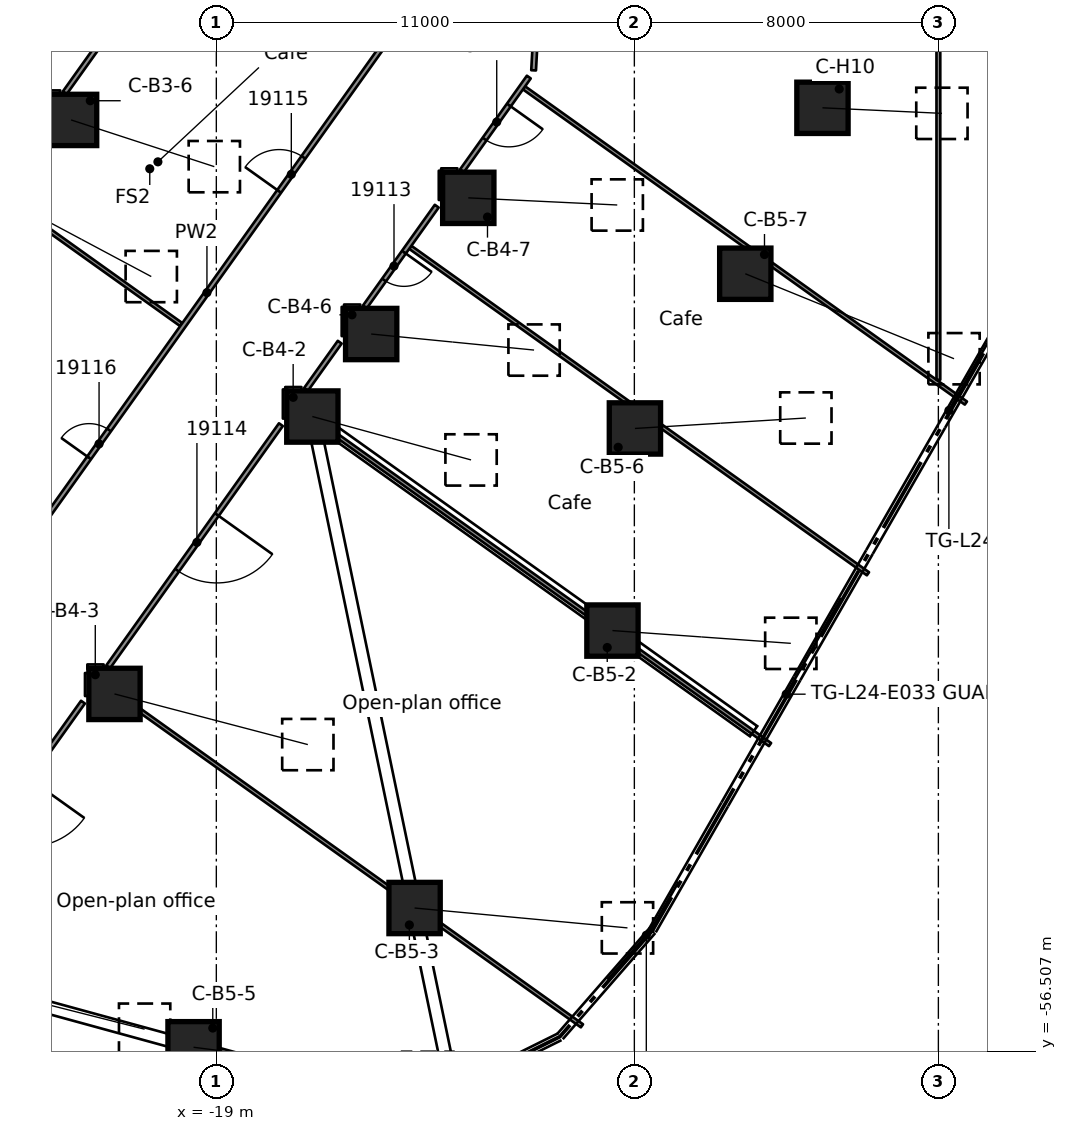
"""IFC4 building model, lengths in metres.
Left out: names, types, materials, properties, quantities, classifications, styles, units other than length and angle.
Written with IfcOpenShell. Run it as: python <this file> out.ifc"""

import sys

from ifc_helpers import new_model, si_unit, direction, frame, frame_2d, origin, origin_2d, place, context, subcontext, project, spatial, rectangle, extrude, element, fill, save


model = new_model("IFC4")
c1 = context("Model", 3, precision=1e-05, world=origin(), true_north=direction((0.0, 1.0)))
c2 = subcontext(c1, "Body", "Model", "MODEL_VIEW")
j1 = project(units=[si_unit("LENGTHUNIT", "METRE"), si_unit("PLANEANGLEUNIT", "RADIAN")], contexts=[c1])
p1 = place(None, origin())
s1 = spatial("IfcSite", under=j1, at=p1, CompositionType="ELEMENT")
p2 = place(p1, origin())
s2 = spatial("IfcBuilding", under=s1, at=p2, CompositionType="ELEMENT")
p3 = place(p2, frame((0.0, 0.0, 98.2)))
s3 = spatial("IfcBuildingStorey", under=s2, at=p3, CompositionType="ELEMENT", Elevation=98.2)
p4 = place(p3, frame((-24.37, -34.166, 0.553), z_axis=(0.723657942308, -0.38573518321, 0.572300228), x_axis=(0.470383419511, 0.882462145731, 0.0)))
e1 = element("IfcColumn", 1, at=p4, inside=s3, PredefinedType="COLUMN", context=c2, shape_type="SweptSolid", body=[
    extrude(rectangle(XDim=1.35, YDim=1.35, at=origin_2d()), origin(), (0.0, 0.0, 1.0), 5.055),
])
p5 = place(p3, frame((-22.822, -31.995, 0.544), z_axis=(0.76622208447, -0.249848553778, 0.592013021347), x_axis=(0.310013339183, 0.950732207053, 0.0)))
e2 = element("IfcColumn", 2, at=p5, inside=s3, PredefinedType="COLUMN", context=c2, shape_type="SweptSolid", body=[
    extrude(rectangle(XDim=1.35, YDim=1.35, at=origin_2d()), origin(), (0.0, 0.0, 1.0), 4.919),
])
p6 = place(p3, frame((-16.473, -39.799, 0.562), z_axis=(0.803489718201, -0.21971009191, 0.553291738831), x_axis=(0.263761556788, 0.964587912614, 0.0)))
e3 = element("IfcColumn", 3, at=p6, inside=s3, PredefinedType="COLUMN", context=c2, shape_type="SweptSolid", body=[
    extrude(rectangle(XDim=1.35, YDim=1.35, at=origin_2d()), origin(), (0.0, 0.0, 1.0), 5.197),
])
p7 = place(p3, frame((-21.68, -47.098, 0.595), z_axis=(0.853278071018, -0.223555579067, 0.471104485851), x_axis=(0.253442130639, 0.967350549913, 0.0)))
e4 = element("IfcColumn", 4, at=p7, inside=s3, PredefinedType="COLUMN", context=c2, shape_type="SweptSolid", body=[
    extrude(rectangle(XDim=1.35, YDim=1.35, at=origin_2d()), origin(), (0.0, 0.0, 1.0), 5.963),
])
p8 = place(p3, frame((-26.887, -54.398, 0.616), z_axis=(0.884883669901, -0.224461458258, 0.408164114664), x_axis=(0.245875069926, 0.969301526868, 0.0)))
e5 = element("IfcColumn", 5, at=p8, inside=s3, PredefinedType="COLUMN", context=c2, shape_type="SweptSolid", body=[
    extrude(rectangle(XDim=1.35, YDim=1.35, at=origin_2d()), origin(), (0.0, 0.0, 1.0), 6.781),
])
p9 = place(p3, frame((-14.925, -37.628, 0.561), z_axis=(0.827494463111, -0.081495666822, 0.555528009924), x_axis=(0.098010679686, 0.995185362969, 0.0)))
e6 = element("IfcColumn", 6, at=p9, inside=s3, PredefinedType="COLUMN", context=c2, shape_type="SweptSolid", body=[
    extrude(rectangle(XDim=1.35, YDim=1.35, at=origin_2d()), origin(), (0.0, 0.0, 1.0), 5.18),
])
p10 = place(p3, frame((-12.37, -34.045, 0.542), z_axis=(0.801721304484, -0.038445874351, 0.596460279216), x_axis=(0.047899120468, 0.998852178382, 0.0)))
e7 = element("IfcColumn", 7, at=p10, inside=s3, PredefinedType="COLUMN", context=c2, shape_type="SweptSolid", body=[
    extrude(rectangle(XDim=1.35, YDim=1.35, at=origin_2d()), origin(), (0.0, 0.0, 1.0), 4.89),
])
p11 = place(p3, frame((-8.576, -45.431, 0.578), z_axis=(0.853552299411, -0.061145641259, 0.517406689873), x_axis=(0.071453557827, 0.997443927784, 0.0)))
e8 = element("IfcColumn", 8, at=p11, inside=s3, PredefinedType="COLUMN", context=c2, shape_type="SweptSolid", body=[
    extrude(rectangle(XDim=1.35, YDim=1.35, at=origin_2d()), origin(), (0.0, 0.0, 1.0), 5.498),
])
p12 = place(p3, frame((-13.783, -52.731, 0.605), z_axis=(0.891988724473, -0.083266793682, 0.444322806621), x_axis=(0.092945511345, 0.995671196691, 0.0)))
e9 = element("IfcColumn", 9, at=p12, inside=s3, PredefinedType="COLUMN", context=c2, shape_type="SweptSolid", body=[
    extrude(rectangle(XDim=1.35, YDim=1.35, at=origin_2d()), origin(), (0.0, 0.0, 1.0), 6.281),
])
p13 = place(p3, frame((-19.599, -56.395, 0.617), z_axis=(0.906052673299, -0.116451460863, 0.406826265709), x_axis=(0.127477562547, 0.991841454592, 0.0)))
e10 = element("IfcColumn", 10, at=p13, inside=s3, PredefinedType="COLUMN", context=c2, shape_type="SweptSolid", body=[
    extrude(rectangle(XDim=1.35, YDim=1.35, at=origin_2d()), origin(), (0.0, 0.0, 1.0), 6.801),
])
p14 = place(p3, frame((-7.985, -40.113, 0.57), z_axis=(0.8427337001, 0.05155019974, 0.53585677902), x_axis=(-0.061056089739, 0.998134336603, 0.0)))
e11 = element("IfcColumn", 11, at=p14, inside=s3, PredefinedType="COLUMN", context=c2, shape_type="SweptSolid", body=[
    extrude(rectangle(XDim=1.35, YDim=1.35, at=origin_2d()), origin(), (0.0, 0.0, 1.0), 5.337),
])
p15 = place(p3, frame((-5.081, -36.042, 0.611), z_axis=(0.838787270737, -0.341442338342, 0.424090844085), x_axis=(0.377026202112, 0.926202592806, 0.0)))
e12 = element("IfcColumn", 12, at=p15, inside=s3, PredefinedType="COLUMN", context=c2, shape_type="SweptSolid", body=[
    extrude(rectangle(XDim=1.35, YDim=1.35, at=origin_2d()), origin(), (0.0, 0.0, 1.0), 6.549),
])
p16 = place(p3, frame((-3.05, -31.676, 0.486), z_axis=(0.719838795512, -0.03343666302, 0.693335487366), x_axis=(0.046400179673, 0.998922931625, 0.0)))
e13 = element("IfcColumn", 13, at=p16, inside=s3, PredefinedType="COLUMN", context=c2, shape_type="SweptSolid", body=[
    extrude(rectangle(XDim=1.35, YDim=1.35, at=origin_2d()), origin(), (0.0, 0.0, 1.0), 4.366),
])
p17 = place(p3, frame((-22.302, -46.613, 0.0), z_axis=(0.0, 0.0, 1.0), x_axis=(0.814113642146, -0.580705586052, 0.0)))
e14 = element("IfcWall", 14, at=p17, inside=s3, PredefinedType="PARTITIONING", context=c2, shape_type="SweptSolid", body=[
    extrude(rectangle(XDim=15.874, YDim=0.1, at=frame_2d((7.937, 0.0))), origin(), (0.0, 0.0, 1.0), 3.58),
])
p18 = place(p3, frame((-24.993, -33.762, 0.0), z_axis=(0.0, 0.0, 1.0), x_axis=(0.813990298992, -0.580878466761, 0.0)))
e15 = element("IfcWall", 15, at=p18, inside=s3, PredefinedType="PARTITIONING", context=c2, shape_type="SweptSolid", body=[
    extrude(rectangle(XDim=6.228, YDim=0.1, at=frame_2d((3.114, 0.0))), origin(), (0.0, 0.0, 1.0), 3.58),
])
p19 = place(p3, frame((-17.095, -39.395, 0.0), z_axis=(0.0, 0.0, 1.0), x_axis=(0.814054615278, -0.580788329209, 0.0)))
e16 = element("IfcWall", 16, at=p19, inside=s3, PredefinedType="PARTITIONING", context=c2, shape_type="SweptSolid", body=[
    extrude(rectangle(XDim=15.558, YDim=0.1, at=frame_2d((7.779, 0.0))), origin(), (0.0, 0.0, 1.0), 3.58),
])
p20 = place(p3, frame((-13.896, -35.347, 0.0), z_axis=(0.0, 0.0, 1.0), x_axis=(0.814118018686, -0.580699450362, 0.0)))
e17 = element("IfcWall", 17, at=p20, inside=s3, PredefinedType="PARTITIONING", context=c2, shape_type="SweptSolid", body=[
    extrude(rectangle(XDim=14.793, YDim=0.1, at=frame_2d((7.396, 0.0))), origin(), (0.0, 0.0, 1.0), 3.58),
])
p21 = place(p3, frame((-10.903, -31.151, 0.0), z_axis=(0.0, 0.0, 1.0), x_axis=(0.814095980234, -0.580730346173, 0.0)))
e18 = element("IfcWall", 18, at=p21, inside=s3, PredefinedType="PARTITIONING", context=c2, shape_type="SweptSolid", body=[
    extrude(rectangle(XDim=14.282, YDim=0.1, at=frame_2d((7.141, 0.0))), origin(), (0.0, 0.0, 1.0), 3.58),
])
p22 = place(p3, frame((-22.394, -46.384, 0.0), z_axis=(0.0, 0.0, 1.0), x_axis=(1.0, 0.0, 0.0)))
e19 = element("IfcWall", 19, at=p22, inside=s3, PredefinedType="PARTITIONING", context=c2, shape_type="SweptSolid", body=[
    extrude(rectangle(XDim=0.428, YDim=0.125, at=frame_2d((0.214, 0.0))), origin(), (0.0, 0.0, 1.0), 3.58),
])
for number, where, z_axis, x_axis in (
    (20, (-17.187, -39.085, 0.0), (0.0, 0.0, 1.0), (1.0, 0.0, 0.0)),
    (21, (-15.639, -36.914, 0.0), (0.0, 0.0, 1.0), (1.0, 0.0, 0.0)),
):
    element("IfcWall", number, at=place(p3, frame(where, z_axis=z_axis, x_axis=x_axis)), inside=s3, PredefinedType="PARTITIONING", context=c2, shape_type="SweptSolid", body=[
        extrude(rectangle(XDim=0.427, YDim=0.125, at=frame_2d((0.213, 0.0))), origin(), (0.0, 0.0, 1.0), 3.58),
    ])
for number, where, z_axis, x_axis in (
    (22, (-13.084, -33.331, 0.0), (0.0, 0.0, 1.0), (1.0, 0.0, 0.0)),
    (23, (-23.536, -31.28, 0.0), (0.0, 0.0, 1.0), (1.0, 0.0, 0.0)),
):
    element("IfcWall", number, at=place(p3, frame(where, z_axis=z_axis, x_axis=x_axis)), inside=s3, PredefinedType="PARTITIONING", context=c2, shape_type="SweptSolid", body=[
        extrude(rectangle(XDim=0.428, YDim=0.125, at=frame_2d((0.214, 0.0))), origin(), (0.0, 0.0, 1.0), 3.58),
    ])
p23 = place(p3, frame((-22.509, -47.314, 0.0), z_axis=(0.0, 0.0, 1.0), x_axis=(-0.580683886647, -0.81412911985, 0.0)))
e24 = element("IfcWall", 24, at=p23, inside=s3, PredefinedType="PARTITIONING", context=c2, shape_type="SweptSolid", body=[
    extrude(rectangle(XDim=5.209, YDim=0.125, at=frame_2d((2.604, 0.0))), origin(), (0.0, 0.0, 1.0), 3.58),
])
p24 = place(p23, frame((2.46, 0.0, 0.0)))
e25 = element("IfcOpeningElement", 25, at=p24, cuts=e24, PredefinedType="OPENING", context=c2, shape_type="SweptSolid", body=[
    extrude(rectangle(XDim=1.8, YDim=2.1, at=frame_2d((0.9, 1.05))), frame((0.0, 0.073, 0.0), z_axis=(0.0, -1.0, 0.0), x_axis=(1.0, 0.0, 0.0)), (0.0, 0.0, 1.0), 0.145),
])
p25 = place(p3, frame((-17.301, -40.013, 0.0), z_axis=(0.0, 0.0, 1.0), x_axis=(-0.58071861579, -0.814104347904, 0.0)))
e26 = element("IfcWall", 26, at=p25, inside=s3, PredefinedType="PARTITIONING", context=c2, shape_type="SweptSolid", body=[
    extrude(rectangle(XDim=7.825, YDim=0.125, at=frame_2d((3.912, 0.0))), origin(), (0.0, 0.0, 1.0), 3.58),
])
p26 = place(p25, frame((2.905, 0.0, 0.0)))
e27 = element("IfcOpeningElement", 27, at=p26, cuts=e26, PredefinedType="OPENING", context=c2, shape_type="SweptSolid", body=[
    extrude(rectangle(XDim=1.8, YDim=2.1, at=frame_2d((0.9, 1.05))), frame((0.0, 0.073, 0.0), z_axis=(0.0, -1.0, 0.0), x_axis=(1.0, 0.0, 0.0)), (0.0, 0.0, 1.0), 0.145),
])
p27 = place(p3, frame((-16.639, -39.084, 0.0), z_axis=(0.0, 0.0, 1.0), x_axis=(0.581056427343, 0.813863273679, 0.0)))
e28 = element("IfcWall", 28, at=p27, inside=s3, PredefinedType="PARTITIONING", context=c2, shape_type="SweptSolid", body=[
    extrude(rectangle(XDim=1.525, YDim=0.125, at=frame_2d((0.762, 0.0))), origin(), (0.0, 0.0, 1.0), 3.58),
])
p28 = place(p3, frame((-13.2, -34.264, 0.0), z_axis=(0.0, 0.0, 1.0), x_axis=(-0.580805225512, -0.814042560324, 0.0)))
e29 = element("IfcWall", 29, at=p28, inside=s3, PredefinedType="PARTITIONING", context=c2, shape_type="SweptSolid", body=[
    extrude(rectangle(XDim=3.254, YDim=0.125, at=frame_2d((1.627, 0.0))), origin(), (0.0, 0.0, 1.0), 3.58),
])
p29 = place(p28, frame((1.487, 0.0, 0.0)))
e30 = element("IfcOpeningElement", 30, at=p29, cuts=e29, PredefinedType="OPENING", context=c2, shape_type="SweptSolid", body=[
    extrude(rectangle(XDim=0.9, YDim=2.1, at=frame_2d((0.45, 1.05))), frame((0.0, 0.073, 0.0), z_axis=(0.0, -1.0, 0.0), x_axis=(1.0, 0.0, 0.0)), (0.0, 0.0, 1.0), 0.145),
])
p30 = place(p3, frame((-10.777, -30.867, 0.0), z_axis=(0.0, 0.0, 1.0), x_axis=(-0.580680826128, -0.81413130278, 0.0)))
e31 = element("IfcWall", 31, at=p30, inside=s3, PredefinedType="PARTITIONING", context=c2, shape_type="SweptSolid", body=[
    extrude(rectangle(XDim=3.025, YDim=0.125, at=frame_2d((1.513, 0.0))), origin(), (0.0, 0.0, 1.0), 3.58),
])
p31 = place(p30, frame((0.904, 0.0, 0.0)))
e32 = element("IfcOpeningElement", 32, at=p31, cuts=e31, PredefinedType="OPENING", context=c2, shape_type="SweptSolid", body=[
    extrude(rectangle(XDim=1.1, YDim=2.1, at=frame_2d((0.55, 1.05))), frame((0.0, 0.073, 0.0), z_axis=(0.0, -1.0, 0.0), x_axis=(1.0, 0.0, 0.0)), (0.0, 0.0, 1.0), 0.145),
])
p32 = place(p3, frame((-24.179, -43.454, 0.0), z_axis=(0.0, 0.0, 1.0), x_axis=(0.580695596551, 0.814120767544, 0.0)))
e33 = element("IfcWall", 33, at=p32, inside=s3, PredefinedType="PARTITIONING", context=c2, shape_type="SweptSolid", body=[
    extrude(rectangle(XDim=16.987, YDim=0.125, at=frame_2d((8.493, 0.0))), origin(), (0.0, 0.0, 1.0), 3.58),
])
p33 = place(p32, frame((11.767, 0.0, 0.0)))
e34 = element("IfcOpeningElement", 34, at=p33, cuts=e33, PredefinedType="OPENING", context=c2, shape_type="SweptSolid", body=[
    extrude(rectangle(XDim=1.1, YDim=2.1, at=frame_2d((0.55, 1.05))), frame((0.0, 0.073, 0.0), z_axis=(0.0, -1.0, 0.0), x_axis=(1.0, 0.0, 0.0)), (0.0, 0.0, 1.0), 0.145),
])
p34 = place(p32, frame((3.155, 0.0, 0.0)))
e35 = element("IfcOpeningElement", 35, at=p34, cuts=e33, PredefinedType="OPENING", context=c2, shape_type="SweptSolid", body=[
    extrude(rectangle(XDim=0.9, YDim=2.1, at=frame_2d((0.45, 1.05))), frame((0.0, 0.073, 0.0), z_axis=(0.0, -1.0, 0.0), x_axis=(1.0, 0.0, 0.0)), (0.0, 0.0, 1.0), 0.145),
])
p35 = place(p3, frame((-18.502, -24.992, 0.0), z_axis=(0.0, 0.0, 1.0), x_axis=(-0.580690883061, -0.814124129559, 0.0)))
e36 = element("IfcWall", 36, at=p35, inside=s3, PredefinedType="PARTITIONING", context=c2, shape_type="SweptSolid", body=[
    extrude(rectangle(XDim=7.724, YDim=0.125, at=frame_2d((3.862, 0.0))), origin(), (0.0, 0.0, 1.0), 3.58),
])
p36 = place(p3, frame((-32.593, -38.546, 0.0), z_axis=(0.0, 0.0, 1.0), x_axis=(0.580752168923, 0.814080412669, 0.0)))
e37 = element("IfcWall", 37, at=p36, inside=s3, PredefinedType="PARTITIONING", context=c2, shape_type="SweptSolid", body=[
    extrude(rectangle(XDim=18.013, YDim=0.125, at=frame_2d((9.006, 0.0))), origin(), (0.0, 0.0, 1.0), 3.58),
])
p37 = place(p36, frame((12.158, 0.0, 0.0)))
e38 = element("IfcOpeningElement", 38, at=p37, cuts=e37, PredefinedType="OPENING", context=c2, shape_type="SweptSolid", body=[
    extrude(rectangle(XDim=1.8, YDim=2.1, at=frame_2d((0.9, 1.05))), frame((0.0, 0.073, 0.0), z_axis=(0.0, -1.0, 0.0), x_axis=(1.0, 0.0, 0.0)), (0.0, 0.0, 1.0), 0.145),
])
p38 = place(p36, frame((3.155, 0.0, 0.0)))
e39 = element("IfcOpeningElement", 39, at=p38, cuts=e37, PredefinedType="OPENING", context=c2, shape_type="SweptSolid", body=[
    extrude(rectangle(XDim=1.8, YDim=2.1, at=frame_2d((0.9, 1.05))), frame((0.0, 0.073, 0.0), z_axis=(0.0, -1.0, 0.0), x_axis=(1.0, 0.0, 0.0)), (0.0, 0.0, 1.0), 0.145),
])
p39 = place(p3, frame((-10.651, -30.69, 0.0), z_axis=(0.0, 0.0, 1.0), x_axis=(0.054362851086, 0.998521246855, 0.0)))
e40 = element("IfcWall", 40, at=p39, inside=s3, PredefinedType="PARTITIONING", context=c2, shape_type="SweptSolid", body=[
    extrude(rectangle(XDim=2.003, YDim=0.125, at=frame_2d((1.001, 0.0))), origin(), (0.0, 0.0, 1.0), 3.58),
])
p40 = place(p3, frame((0.0, -38.832, 0.0), z_axis=(0.0, 0.0, 1.0), x_axis=(0.0, 1.0, 0.0)))
e41 = element("IfcWall", 41, at=p40, inside=s3, PredefinedType="PARTITIONING", context=c2, shape_type="SweptSolid", body=[
    extrude(rectangle(XDim=23.77, YDim=0.1, at=frame_2d((11.885, 0.0))), origin(), (0.0, 0.0, 1.0), 3.58),
])
p41 = place(p3, frame((-13.084, -34.101, 0.0), z_axis=(0.0, 0.0, 1.0), x_axis=(0.0, 1.0, 0.0)))
e42 = element("IfcWall", 42, at=p41, inside=s3, PredefinedType="PARTITIONING", context=c2, shape_type="SweptSolid", body=[
    extrude(rectangle(XDim=0.77, YDim=0.125, at=frame_2d((0.385, 0.0))), origin(), (0.0, 0.0, 1.0), 3.58),
])
p42 = place(p3, frame((-15.639, -37.683, 0.0), z_axis=(0.0, 0.0, 1.0), x_axis=(0.0, 1.0, 0.0)))
e43 = element("IfcWall", 43, at=p42, inside=s3, PredefinedType="PARTITIONING", context=c2, shape_type="SweptSolid", body=[
    extrude(rectangle(XDim=0.769, YDim=0.125, at=frame_2d((0.385, 0.0))), origin(), (0.0, 0.0, 1.0), 3.58),
])
p43 = place(p3, frame((-17.187, -39.853, 0.0), z_axis=(0.0, 0.0, 1.0), x_axis=(0.0, 1.0, 0.0)))
e44 = element("IfcWall", 44, at=p43, inside=s3, PredefinedType="PARTITIONING", context=c2, shape_type="SweptSolid", body=[
    extrude(rectangle(XDim=0.768, YDim=0.125, at=frame_2d((0.384, 0.0))), origin(), (0.0, 0.0, 1.0), 3.58),
])
p44 = place(p3, frame((-22.394, -47.153, 0.0), z_axis=(0.0, 0.0, 1.0), x_axis=(0.0, 1.0, 0.0)))
e45 = element("IfcWall", 45, at=p44, inside=s3, PredefinedType="PARTITIONING", context=c2, shape_type="SweptSolid", body=[
    extrude(rectangle(XDim=0.605, YDim=0.125, at=frame_2d((0.302, 0.0))), origin(), (0.0, 0.0, 1.0), 3.58),
])
p45 = place(p31, origin())
e46 = element("IfcDoor", 46, at=p45, inside=s3, OperationType="SINGLE_SWING_LEFT", PredefinedType="DOOR", context=c2, shape_type="SweptSolid", body=[
    extrude(rectangle(XDim=1.1, YDim=2.1, at=frame_2d((0.55, 1.05))), frame((0.0, 0.025, 0.0), z_axis=(0.0, -1.0, 0.0), x_axis=(1.0, 0.0, 0.0)), (0.0, 0.0, 1.0), 0.05),
])
fill(e32, e46)
p46 = place(p29, origin())
e47 = element("IfcDoor", 47, at=p46, inside=s3, OperationType="SINGLE_SWING_RIGHT", PredefinedType="DOOR", context=c2, shape_type="SweptSolid", body=[
    extrude(rectangle(XDim=0.9, YDim=2.1, at=frame_2d((0.45, 1.05))), frame((0.0, 0.025, 0.0), z_axis=(0.0, -1.0, 0.0), x_axis=(1.0, 0.0, 0.0)), (0.0, 0.0, 1.0), 0.05),
])
fill(e30, e47)
p47 = place(p26, origin())
e48 = element("IfcDoor", 48, at=p47, inside=s3, OperationType="DOUBLE_DOOR_SINGLE_SWING", PredefinedType="DOOR", context=c2, shape_type="SweptSolid", body=[
    extrude(rectangle(XDim=1.8, YDim=2.1, at=frame_2d((0.9, 1.05))), frame((0.0, 0.025, 0.0), z_axis=(0.0, -1.0, 0.0), x_axis=(1.0, 0.0, 0.0)), (0.0, 0.0, 1.0), 0.05),
])
fill(e27, e48)
p48 = place(p33, origin())
e49 = element("IfcDoor", 49, at=p48, inside=s3, OperationType="SINGLE_SWING_RIGHT", PredefinedType="DOOR", context=c2, shape_type="SweptSolid", body=[
    extrude(rectangle(XDim=1.1, YDim=2.1, at=frame_2d((0.55, 1.05))), frame((0.0, 0.025, 0.0), z_axis=(0.0, -1.0, 0.0), x_axis=(1.0, 0.0, 0.0)), (0.0, 0.0, 1.0), 0.05),
])
fill(e34, e49)
p49 = place(p34, origin())
e50 = element("IfcDoor", 50, at=p49, inside=s3, OperationType="SINGLE_SWING_LEFT", PredefinedType="DOOR", context=c2, shape_type="SweptSolid", body=[
    extrude(rectangle(XDim=0.9, YDim=2.1, at=frame_2d((0.45, 1.05))), frame((0.0, 0.025, 0.0), z_axis=(0.0, -1.0, 0.0), x_axis=(1.0, 0.0, 0.0)), (0.0, 0.0, 1.0), 0.05),
])
fill(e35, e50)
save(model, sys.argv[1])
